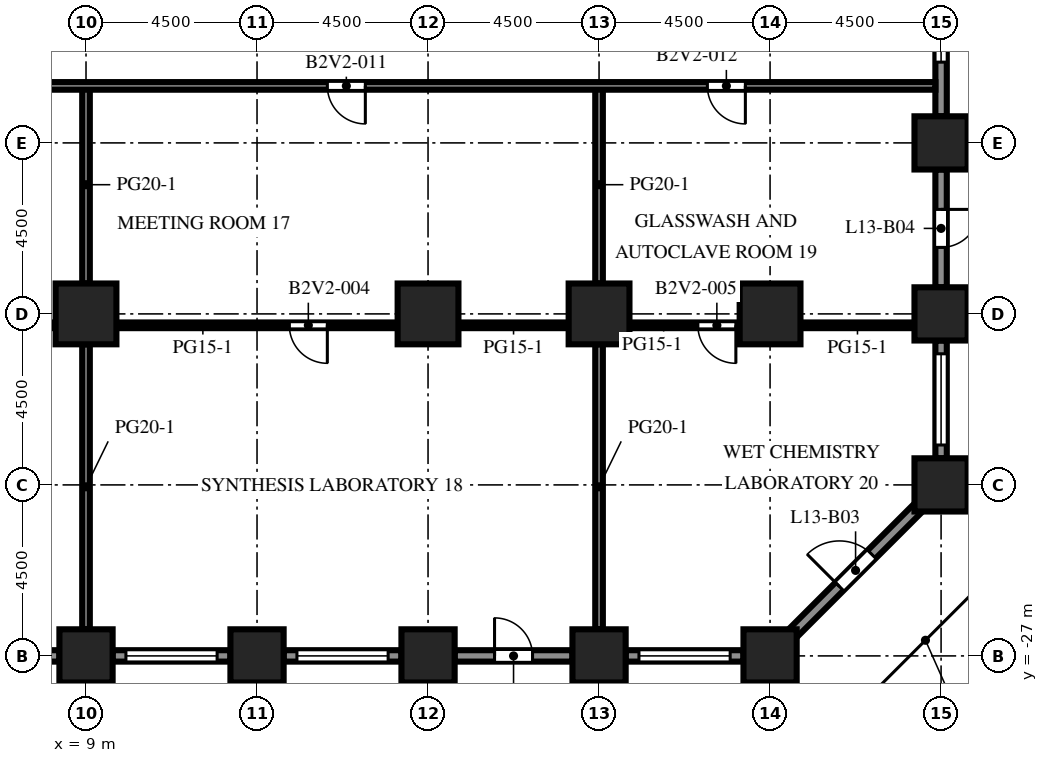
"""IFC4 building model, lengths in metres.
Left out: names, types, materials, properties, quantities, classifications, styles, units other than length and angle.
Written with IfcOpenShell. Run it as: python <this file> out.ifc"""

import sys

from ifc_helpers import new_model, si_unit, direction, frame, frame_2d, origin, origin_2d, place, context, subcontext, project, spatial, rectangle, extrude, element, fill, save


model = new_model("IFC4")
c1 = context("Model", 3, precision=1e-05, world=origin(), true_north=direction((0.0, 1.0)))
c2 = subcontext(c1, "Body", "Model", "MODEL_VIEW")
j1 = project(units=[si_unit("LENGTHUNIT", "METRE"), si_unit("PLANEANGLEUNIT", "RADIAN")], contexts=[c1])
p1 = place(None, origin())
s1 = spatial("IfcSite", under=j1, at=p1, CompositionType="ELEMENT")
p2 = place(p1, origin())
s2 = spatial("IfcBuilding", under=s1, at=p2, CompositionType="ELEMENT")
p3 = place(p2, frame((0.0, 0.0, 58.3)))
s3 = spatial("IfcBuildingStorey", under=s2, at=p3, CompositionType="ELEMENT", Elevation=58.3)
for number, where, z_axis, x_axis in (
    (1, (9.0, -27.0, 0.0), (0.0, 0.0, 1.0), (1.0, 0.0, 0.0)),
    (2, (13.5, -27.0, 0.0), (0.0, 0.0, 1.0), (1.0, 0.0, 0.0)),
    (3, (18.0, -27.0, 0.0), (0.0, 0.0, 1.0), (1.0, 0.0, 0.0)),
    (4, (22.5, -27.0, 0.0), (0.0, 0.0, 1.0), (1.0, 0.0, 0.0)),
    (5, (27.0, -27.0, 0.0), (0.0, 0.0, 1.0), (1.0, 0.0, 0.0)),
    (6, (31.5, -22.5, 0.0), (0.0, 0.0, 1.0), (1.0, 0.0, 0.0)),
    (7, (31.5, -18.0, 0.0), (0.0, 0.0, 1.0), (1.0, 0.0, 0.0)),
    (8, (31.5, -13.5, 0.0), (0.0, 0.0, 1.0), (1.0, 0.0, 0.0)),
):
    element("IfcColumn", number, at=place(p3, frame(where, z_axis=z_axis, x_axis=x_axis)), inside=s3, PredefinedType="COLUMN", context=c2, shape_type="SweptSolid", body=[
        extrude(rectangle(XDim=1.4, YDim=1.4, at=origin_2d()), origin(), (0.0, 0.0, 1.0), 4.1),
    ])
for number, where, z_axis, x_axis in (
    (9, (9.0, -18.0, 0.0), (0.0, 0.0, 1.0), (1.0, 0.0, 0.0)),
    (10, (18.0, -18.0, 0.0), (0.0, 0.0, 1.0), (1.0, 0.0, 0.0)),
    (11, (22.5, -18.0, 0.0), (0.0, 0.0, 1.0), (1.0, 0.0, 0.0)),
    (12, (27.0, -18.0, 0.0), (0.0, 0.0, 1.0), (1.0, 0.0, 0.0)),
):
    element("IfcColumn", number, at=place(p3, frame(where, z_axis=z_axis, x_axis=x_axis)), inside=s3, PredefinedType="COLUMN", context=c2, shape_type="SweptSolid", body=[
        extrude(rectangle(XDim=1.6, YDim=1.6, at=origin_2d()), origin(), (0.0, 0.0, 1.0), 4.1),
    ])
p4 = place(p3, frame((8.3, -27.0, 0.0), z_axis=(0.0, 0.0, 1.0), x_axis=(-1.0, 0.0, 0.0)))
e13 = element("IfcWall", 13, at=p4, inside=s3, PredefinedType="SOLIDWALL", context=c2, shape_type="SweptSolid", body=[
    extrude(rectangle(XDim=3.1, YDim=0.3, at=frame_2d((1.55, 0.0))), origin(), (0.0, 0.0, 1.0), 2.75),
])
p5 = place(p4, frame((0.35, 0.0, 0.8)))
e14 = element("IfcOpeningElement", 14, at=p5, cuts=e13, PredefinedType="OPENING", context=c2, shape_type="SweptSolid", body=[
    extrude(rectangle(XDim=2.4, YDim=1.7, at=frame_2d((1.2, 0.85))), frame((0.0, 0.16, 0.0), z_axis=(0.0, -1.0, 0.0), x_axis=(1.0, 0.0, 0.0)), (0.0, 0.0, 1.0), 0.32),
])
p6 = place(p3, frame((12.8, -27.0, 0.0), z_axis=(0.0, 0.0, 1.0), x_axis=(-1.0, 0.0, 0.0)))
e15 = element("IfcWall", 15, at=p6, inside=s3, PredefinedType="SOLIDWALL", context=c2, shape_type="SweptSolid", body=[
    extrude(rectangle(XDim=3.1, YDim=0.3, at=frame_2d((1.55, 0.0))), origin(), (0.0, 0.0, 1.0), 2.75),
])
p7 = place(p6, frame((0.35, 0.0, 0.8)))
e16 = element("IfcOpeningElement", 16, at=p7, cuts=e15, PredefinedType="OPENING", context=c2, shape_type="SweptSolid", body=[
    extrude(rectangle(XDim=2.4, YDim=1.7, at=frame_2d((1.2, 0.85))), frame((0.0, 0.16, 0.0), z_axis=(0.0, -1.0, 0.0), x_axis=(1.0, 0.0, 0.0)), (0.0, 0.0, 1.0), 0.32),
])
p8 = place(p3, frame((17.3, -27.0, 0.0), z_axis=(0.0, 0.0, 1.0), x_axis=(-1.0, 0.0, 0.0)))
e17 = element("IfcWall", 17, at=p8, inside=s3, PredefinedType="SOLIDWALL", context=c2, shape_type="SweptSolid", body=[
    extrude(rectangle(XDim=3.1, YDim=0.3, at=frame_2d((1.55, 0.0))), origin(), (0.0, 0.0, 1.0), 2.75),
])
p9 = place(p8, frame((0.35, 0.0, 0.8)))
e18 = element("IfcOpeningElement", 18, at=p9, cuts=e17, PredefinedType="OPENING", context=c2, shape_type="SweptSolid", body=[
    extrude(rectangle(XDim=2.4, YDim=1.7, at=frame_2d((1.2, 0.85))), frame((0.0, 0.16, 0.0), z_axis=(0.0, -1.0, 0.0), x_axis=(1.0, 0.0, 0.0)), (0.0, 0.0, 1.0), 0.32),
])
p10 = place(p3, frame((21.8, -27.0, 0.0), z_axis=(0.0, 0.0, 1.0), x_axis=(-1.0, 0.0, 0.0)))
e19 = element("IfcWall", 19, at=p10, inside=s3, PredefinedType="SOLIDWALL", context=c2, shape_type="SweptSolid", body=[
    extrude(rectangle(XDim=3.1, YDim=0.3, at=frame_2d((1.55, 0.0))), origin(), (0.0, 0.0, 1.0), 2.75),
])
p11 = place(p10, frame((1.05, 0.0, 0.0)))
e20 = element("IfcOpeningElement", 20, at=p11, cuts=e19, PredefinedType="OPENING", context=c2, shape_type="SweptSolid", body=[
    extrude(rectangle(XDim=1.0, YDim=2.2, at=frame_2d((0.5, 1.1))), frame((0.0, 0.16, 0.0), z_axis=(0.0, -1.0, 0.0), x_axis=(1.0, 0.0, 0.0)), (0.0, 0.0, 1.0), 0.32),
])
p12 = place(p3, frame((26.3, -27.0, 0.0), z_axis=(0.0, 0.0, 1.0), x_axis=(-1.0, 0.0, 0.0)))
e21 = element("IfcWall", 21, at=p12, inside=s3, PredefinedType="SOLIDWALL", context=c2, shape_type="SweptSolid", body=[
    extrude(rectangle(XDim=3.1, YDim=0.3, at=frame_2d((1.55, 0.0))), origin(), (0.0, 0.0, 1.0), 2.75),
])
p13 = place(p12, frame((0.35, 0.0, 0.8)))
e22 = element("IfcOpeningElement", 22, at=p13, cuts=e21, PredefinedType="OPENING", context=c2, shape_type="SweptSolid", body=[
    extrude(rectangle(XDim=2.4, YDim=1.7, at=frame_2d((1.2, 0.85))), frame((0.0, 0.16, 0.0), z_axis=(0.0, -1.0, 0.0), x_axis=(1.0, 0.0, 0.0)), (0.0, 0.0, 1.0), 0.32),
])
p14 = place(p3, frame((30.906, -23.094, 0.0), z_axis=(0.0, 0.0, 1.0), x_axis=(-0.707106781187, -0.707106781187, 0.0)))
e23 = element("IfcWall", 23, at=p14, inside=s3, PredefinedType="SOLIDWALL", context=c2, shape_type="SweptSolid", body=[
    extrude(rectangle(XDim=4.684, YDim=0.3, at=frame_2d((2.342, 0.0))), origin(), (0.0, 0.0, 1.0), 2.75),
])
p15 = place(p14, frame((1.742, 0.0, 0.0)))
e24 = element("IfcOpeningElement", 24, at=p15, cuts=e23, PredefinedType="OPENING", context=c2, shape_type="SweptSolid", body=[
    extrude(rectangle(XDim=1.2, YDim=2.2, at=frame_2d((0.6, 1.1))), frame((0.0, 0.16, 0.0), z_axis=(0.0, -1.0, 0.0), x_axis=(1.0, 0.0, 0.0)), (0.0, 0.0, 1.0), 0.32),
])
p16 = place(p3, frame((31.5, -18.7, 0.0), z_axis=(0.0, 0.0, 1.0), x_axis=(0.0, -1.0, 0.0)))
e25 = element("IfcWall", 25, at=p16, inside=s3, PredefinedType="SOLIDWALL", context=c2, shape_type="SweptSolid", body=[
    extrude(rectangle(XDim=3.1, YDim=0.3, at=frame_2d((1.55, 0.0))), origin(), (0.0, 0.0, 1.0), 2.75),
])
p17 = place(p16, frame((0.35, 0.0, 0.8)))
e26 = element("IfcOpeningElement", 26, at=p17, cuts=e25, PredefinedType="OPENING", context=c2, shape_type="SweptSolid", body=[
    extrude(rectangle(XDim=2.4, YDim=1.7, at=frame_2d((1.2, 0.85))), frame((0.0, 0.16, 0.0), z_axis=(0.0, -1.0, 0.0), x_axis=(1.0, 0.0, 0.0)), (0.0, 0.0, 1.0), 0.32),
])
p18 = place(p3, frame((31.5, -14.2, 0.0), z_axis=(0.0, 0.0, 1.0), x_axis=(0.0, -1.0, 0.0)))
e27 = element("IfcWall", 27, at=p18, inside=s3, PredefinedType="SOLIDWALL", context=c2, shape_type="SweptSolid", body=[
    extrude(rectangle(XDim=3.1, YDim=0.3, at=frame_2d((1.55, 0.0))), origin(), (0.0, 0.0, 1.0), 2.75),
])
p19 = place(p18, frame((1.05, 0.0, 0.0)))
e28 = element("IfcOpeningElement", 28, at=p19, cuts=e27, PredefinedType="OPENING", context=c2, shape_type="SweptSolid", body=[
    extrude(rectangle(XDim=1.0, YDim=2.2, at=frame_2d((0.5, 1.1))), frame((0.0, 0.16, 0.0), z_axis=(0.0, -1.0, 0.0), x_axis=(1.0, 0.0, 0.0)), (0.0, 0.0, 1.0), 0.32),
])
p20 = place(p3, frame((31.5, -9.7, 0.0), z_axis=(0.0, 0.0, 1.0), x_axis=(0.0, -1.0, 0.0)))
e29 = element("IfcWall", 29, at=p20, inside=s3, PredefinedType="SOLIDWALL", context=c2, shape_type="SweptSolid", body=[
    extrude(rectangle(XDim=3.1, YDim=0.3, at=frame_2d((1.55, 0.0))), origin(), (0.0, 0.0, 1.0), 2.75),
])
p21 = place(p20, frame((0.475, 0.0, 0.8)))
e30 = element("IfcOpeningElement", 30, at=p21, cuts=e29, PredefinedType="OPENING", context=c2, shape_type="SweptSolid", body=[
    extrude(rectangle(XDim=1.2, YDim=1.7, at=frame_2d((0.6, 0.85))), frame((0.0, 0.16, 0.0), z_axis=(0.0, -1.0, 0.0), x_axis=(1.0, 0.0, 0.0)), (0.0, 0.0, 1.0), 0.32),
])
p22 = place(p3, frame((9.0, -26.3, 0.0), z_axis=(0.0, 0.0, 1.0), x_axis=(0.0, 1.0, 0.0)))
e31 = element("IfcWall", 31, at=p22, inside=s3, PredefinedType="PARTITIONING", context=c2, shape_type="SweptSolid", body=[
    extrude(rectangle(XDim=7.5, YDim=0.2, at=frame_2d((3.75, 0.0))), origin(), (0.0, 0.0, 1.0), 3.65),
])
p23 = place(p3, frame((9.0, -17.2, 0.0), z_axis=(0.0, 0.0, 1.0), x_axis=(0.0, 1.0, 0.0)))
e32 = element("IfcWall", 32, at=p23, inside=s3, PredefinedType="PARTITIONING", context=c2, shape_type="SweptSolid", body=[
    extrude(rectangle(XDim=5.2, YDim=0.2, at=frame_2d((2.6, 0.0))), origin(), (0.0, 0.0, 1.0), 3.65),
])
p24 = place(p3, frame((22.5, -26.3, 0.0), z_axis=(0.0, 0.0, 1.0), x_axis=(0.0, 1.0, 0.0)))
e33 = element("IfcWall", 33, at=p24, inside=s3, PredefinedType="PARTITIONING", context=c2, shape_type="SweptSolid", body=[
    extrude(rectangle(XDim=7.5, YDim=0.2, at=frame_2d((3.75, 0.0))), origin(), (0.0, 0.0, 1.0), 3.65),
])
p25 = place(p3, frame((22.5, -17.2, 0.0), z_axis=(0.0, 0.0, 1.0), x_axis=(0.0, 1.0, 0.0)))
e34 = element("IfcWall", 34, at=p25, inside=s3, PredefinedType="PARTITIONING", context=c2, shape_type="SweptSolid", body=[
    extrude(rectangle(XDim=5.2, YDim=0.2, at=frame_2d((2.6, 0.0))), origin(), (0.0, 0.0, 1.0), 3.65),
])
p26 = place(p3, frame((8.2, -18.3, 0.0), z_axis=(0.0, 0.0, 1.0), x_axis=(-1.0, 0.0, 0.0)))
e35 = element("IfcWall", 35, at=p26, inside=s3, PredefinedType="PARTITIONING", context=c2, shape_type="SweptSolid", body=[
    extrude(rectangle(XDim=7.4, YDim=0.15, at=frame_2d((3.7, 0.0))), origin(), (0.0, 0.0, 1.0), 3.65),
])
p27 = place(p26, frame((2.1, 0.0, 0.0)))
e36 = element("IfcOpeningElement", 36, at=p27, cuts=e35, PredefinedType="OPENING", context=c2, shape_type="SweptSolid", body=[
    extrude(rectangle(XDim=1.0, YDim=2.1, at=frame_2d((0.5, 1.05))), frame((0.0, 0.085, 0.0), z_axis=(0.0, -1.0, 0.0), x_axis=(1.0, 0.0, 0.0)), (0.0, 0.0, 1.0), 0.17),
])
p28 = place(p3, frame((17.2, -18.3, 0.0), z_axis=(0.0, 0.0, 1.0), x_axis=(-1.0, 0.0, 0.0)))
e37 = element("IfcWall", 37, at=p28, inside=s3, PredefinedType="PARTITIONING", context=c2, shape_type="SweptSolid", body=[
    extrude(rectangle(XDim=7.4, YDim=0.15, at=frame_2d((3.7, 0.0))), origin(), (0.0, 0.0, 1.0), 3.65),
])
p29 = place(p28, frame((1.85, 0.0, 0.0)))
e38 = element("IfcOpeningElement", 38, at=p29, cuts=e37, PredefinedType="OPENING", context=c2, shape_type="SweptSolid", body=[
    extrude(rectangle(XDim=1.0, YDim=2.1, at=frame_2d((0.5, 1.05))), frame((0.0, 0.085, 0.0), z_axis=(0.0, -1.0, 0.0), x_axis=(1.0, 0.0, 0.0)), (0.0, 0.0, 1.0), 0.17),
])
p30 = place(p3, frame((18.8, -18.3, 0.0), z_axis=(0.0, 0.0, 1.0), x_axis=(1.0, 0.0, 0.0)))
e39 = element("IfcWall", 39, at=p30, inside=s3, PredefinedType="PARTITIONING", context=c2, shape_type="SweptSolid", body=[
    extrude(rectangle(XDim=2.9, YDim=0.15, at=frame_2d((1.45, 0.0))), origin(), (0.0, 0.0, 1.0), 3.65),
])
p31 = place(p3, frame((26.2, -18.3, 0.0), z_axis=(0.0, 0.0, 1.0), x_axis=(-1.0, 0.0, 0.0)))
e40 = element("IfcWall", 40, at=p31, inside=s3, PredefinedType="PARTITIONING", context=c2, shape_type="SweptSolid", body=[
    extrude(rectangle(XDim=2.9, YDim=0.15, at=frame_2d((1.45, 0.0))), origin(), (0.0, 0.0, 1.0), 3.65),
])
p32 = place(p31, frame((0.1, 0.0, 0.0)))
e41 = element("IfcOpeningElement", 41, at=p32, cuts=e40, PredefinedType="OPENING", context=c2, shape_type="SweptSolid", body=[
    extrude(rectangle(XDim=1.0, YDim=2.1, at=frame_2d((0.5, 1.05))), frame((0.0, 0.085, 0.0), z_axis=(0.0, -1.0, 0.0), x_axis=(1.0, 0.0, 0.0)), (0.0, 0.0, 1.0), 0.17),
])
p33 = place(p3, frame((27.8, -18.3, 0.0), z_axis=(0.0, 0.0, 1.0), x_axis=(1.0, 0.0, 0.0)))
e42 = element("IfcWall", 42, at=p33, inside=s3, PredefinedType="PARTITIONING", context=c2, shape_type="SweptSolid", body=[
    extrude(rectangle(XDim=3.0, YDim=0.15, at=frame_2d((1.5, 0.0))), origin(), (0.0, 0.0, 1.0), 3.65),
])
p34 = place(p3, frame((31.35, -12.0, 0.0), z_axis=(0.0, 0.0, 1.0), x_axis=(-1.0, 0.0, 0.0)))
e43 = element("IfcWall", 43, at=p34, inside=s3, PredefinedType="PARTITIONING", context=c2, shape_type="SweptSolid", body=[
    extrude(rectangle(XDim=53.7, YDim=0.2, at=frame_2d((26.85, 0.0))), origin(), (0.0, 0.0, 1.0), 3.65),
])
p35 = place(p34, frame((45.25, 0.0, 0.0)))
e44 = element("IfcOpeningElement", 44, at=p35, cuts=e43, PredefinedType="OPENING", context=c2, shape_type="SweptSolid", body=[
    extrude(rectangle(XDim=1.0, YDim=2.1, at=frame_2d((0.5, 1.05))), frame((0.0, 0.11, 0.0), z_axis=(0.0, -1.0, 0.0), x_axis=(1.0, 0.0, 0.0)), (0.0, 0.0, 1.0), 0.22),
])
p36 = place(p34, frame((34.25, 0.0, 0.0)))
e45 = element("IfcOpeningElement", 45, at=p36, cuts=e43, PredefinedType="OPENING", context=c2, shape_type="SweptSolid", body=[
    extrude(rectangle(XDim=1.0, YDim=2.1, at=frame_2d((0.5, 1.05))), frame((0.0, 0.11, 0.0), z_axis=(0.0, -1.0, 0.0), x_axis=(1.0, 0.0, 0.0)), (0.0, 0.0, 1.0), 0.22),
])
p37 = place(p34, frame((25.5, 0.0, 0.0)))
e46 = element("IfcOpeningElement", 46, at=p37, cuts=e43, PredefinedType="OPENING", context=c2, shape_type="SweptSolid", body=[
    extrude(rectangle(XDim=1.0, YDim=2.1, at=frame_2d((0.5, 1.05))), frame((0.0, 0.11, 0.0), z_axis=(0.0, -1.0, 0.0), x_axis=(1.0, 0.0, 0.0)), (0.0, 0.0, 1.0), 0.22),
])
p38 = place(p34, frame((15.0, 0.0, 0.0)))
e47 = element("IfcOpeningElement", 47, at=p38, cuts=e43, PredefinedType="OPENING", context=c2, shape_type="SweptSolid", body=[
    extrude(rectangle(XDim=1.0, YDim=2.1, at=frame_2d((0.5, 1.05))), frame((0.0, 0.11, 0.0), z_axis=(0.0, -1.0, 0.0), x_axis=(1.0, 0.0, 0.0)), (0.0, 0.0, 1.0), 0.22),
])
p39 = place(p34, frame((5.0, 0.0, 0.0)))
e48 = element("IfcOpeningElement", 48, at=p39, cuts=e43, PredefinedType="OPENING", context=c2, shape_type="SweptSolid", body=[
    extrude(rectangle(XDim=1.0, YDim=2.1, at=frame_2d((0.5, 1.05))), frame((0.0, 0.11, 0.0), z_axis=(0.0, -1.0, 0.0), x_axis=(1.0, 0.0, 0.0)), (0.0, 0.0, 1.0), 0.22),
])
p40 = place(p7, origin())
e49 = element("IfcWindow", 49, at=p40, inside=s3, PartitioningType="SINGLE_PANEL", PredefinedType="WINDOW", context=c2, shape_type="SweptSolid", body=[
    extrude(rectangle(XDim=2.4, YDim=1.7, at=frame_2d((1.2, 0.85))), frame((0.0, 0.03, 0.0), z_axis=(0.0, -1.0, 0.0), x_axis=(1.0, 0.0, 0.0)), (0.0, 0.0, 1.0), 0.06),
])
fill(e16, e49)
p41 = place(p9, origin())
e50 = element("IfcWindow", 50, at=p41, inside=s3, PartitioningType="SINGLE_PANEL", PredefinedType="WINDOW", context=c2, shape_type="SweptSolid", body=[
    extrude(rectangle(XDim=2.4, YDim=1.7, at=frame_2d((1.2, 0.85))), frame((0.0, 0.03, 0.0), z_axis=(0.0, -1.0, 0.0), x_axis=(1.0, 0.0, 0.0)), (0.0, 0.0, 1.0), 0.06),
])
fill(e18, e50)
p42 = place(p11, origin())
e51 = element("IfcDoor", 51, at=p42, inside=s3, OperationType="SINGLE_SWING_RIGHT", PredefinedType="DOOR", context=c2, shape_type="SweptSolid", body=[
    extrude(rectangle(XDim=1.0, YDim=2.2, at=frame_2d((0.5, 1.1))), frame((0.0, 0.025, 0.0), z_axis=(0.0, -1.0, 0.0), x_axis=(1.0, 0.0, 0.0)), (0.0, 0.0, 1.0), 0.05),
])
fill(e20, e51)
p43 = place(p13, origin())
e52 = element("IfcWindow", 52, at=p43, inside=s3, PartitioningType="SINGLE_PANEL", PredefinedType="WINDOW", context=c2, shape_type="SweptSolid", body=[
    extrude(rectangle(XDim=2.4, YDim=1.7, at=frame_2d((1.2, 0.85))), frame((0.0, 0.03, 0.0), z_axis=(0.0, -1.0, 0.0), x_axis=(1.0, 0.0, 0.0)), (0.0, 0.0, 1.0), 0.06),
])
fill(e22, e52)
p44 = place(p15, origin())
e53 = element("IfcDoor", 53, at=p44, inside=s3, OperationType="SINGLE_SWING_RIGHT", PredefinedType="DOOR", context=c2, shape_type="SweptSolid", body=[
    extrude(rectangle(XDim=1.2, YDim=2.2, at=frame_2d((0.6, 1.1))), frame((0.0, 0.025, 0.0), z_axis=(0.0, -1.0, 0.0), x_axis=(1.0, 0.0, 0.0)), (0.0, 0.0, 1.0), 0.05),
])
fill(e24, e53)
p45 = place(p17, origin())
e54 = element("IfcWindow", 54, at=p45, inside=s3, PartitioningType="SINGLE_PANEL", PredefinedType="WINDOW", context=c2, shape_type="SweptSolid", body=[
    extrude(rectangle(XDim=2.4, YDim=1.7, at=frame_2d((1.2, 0.85))), frame((0.0, 0.03, 0.0), z_axis=(0.0, -1.0, 0.0), x_axis=(1.0, 0.0, 0.0)), (0.0, 0.0, 1.0), 0.06),
])
fill(e26, e54)
p46 = place(p19, origin())
e55 = element("IfcDoor", 55, at=p46, inside=s3, OperationType="SINGLE_SWING_LEFT", PredefinedType="DOOR", context=c2, shape_type="SweptSolid", body=[
    extrude(rectangle(XDim=1.0, YDim=2.2, at=frame_2d((0.5, 1.1))), frame((0.0, 0.025, 0.0), z_axis=(0.0, -1.0, 0.0), x_axis=(1.0, 0.0, 0.0)), (0.0, 0.0, 1.0), 0.05),
])
fill(e28, e55)
p47 = place(p21, origin())
e56 = element("IfcWindow", 56, at=p47, inside=s3, PartitioningType="SINGLE_PANEL", PredefinedType="WINDOW", context=c2, shape_type="SweptSolid", body=[
    extrude(rectangle(XDim=1.2, YDim=1.7, at=frame_2d((0.6, 0.85))), frame((0.0, 0.03, 0.0), z_axis=(0.0, -1.0, 0.0), x_axis=(1.0, 0.0, 0.0)), (0.0, 0.0, 1.0), 0.06),
])
fill(e30, e56)
p48 = place(p29, origin())
e57 = element("IfcDoor", 57, at=p48, inside=s3, OperationType="SINGLE_SWING_LEFT", PredefinedType="DOOR", context=c2, shape_type="SweptSolid", body=[
    extrude(rectangle(XDim=1.0, YDim=2.1, at=frame_2d((0.5, 1.05))), frame((0.0, 0.025, 0.0), z_axis=(0.0, -1.0, 0.0), x_axis=(1.0, 0.0, 0.0)), (0.0, 0.0, 1.0), 0.05),
])
fill(e38, e57)
p49 = place(p32, origin())
e58 = element("IfcDoor", 58, at=p49, inside=s3, OperationType="SINGLE_SWING_LEFT", PredefinedType="DOOR", context=c2, shape_type="SweptSolid", body=[
    extrude(rectangle(XDim=1.0, YDim=2.1, at=frame_2d((0.5, 1.05))), frame((0.0, 0.025, 0.0), z_axis=(0.0, -1.0, 0.0), x_axis=(1.0, 0.0, 0.0)), (0.0, 0.0, 1.0), 0.05),
])
fill(e41, e58)
p50 = place(p38, origin())
e59 = element("IfcDoor", 59, at=p50, inside=s3, OperationType="SINGLE_SWING_LEFT", PredefinedType="DOOR", context=c2, shape_type="SweptSolid", body=[
    extrude(rectangle(XDim=1.0, YDim=2.1, at=frame_2d((0.5, 1.05))), frame((0.0, 0.025, 0.0), z_axis=(0.0, -1.0, 0.0), x_axis=(1.0, 0.0, 0.0)), (0.0, 0.0, 1.0), 0.05),
])
fill(e47, e59)
p51 = place(p39, origin())
e60 = element("IfcDoor", 60, at=p51, inside=s3, OperationType="SINGLE_SWING_LEFT", PredefinedType="DOOR", context=c2, shape_type="SweptSolid", body=[
    extrude(rectangle(XDim=1.0, YDim=2.1, at=frame_2d((0.5, 1.05))), frame((0.0, 0.025, 0.0), z_axis=(0.0, -1.0, 0.0), x_axis=(1.0, 0.0, 0.0)), (0.0, 0.0, 1.0), 0.05),
])
fill(e48, e60)
save(model, sys.argv[1])
